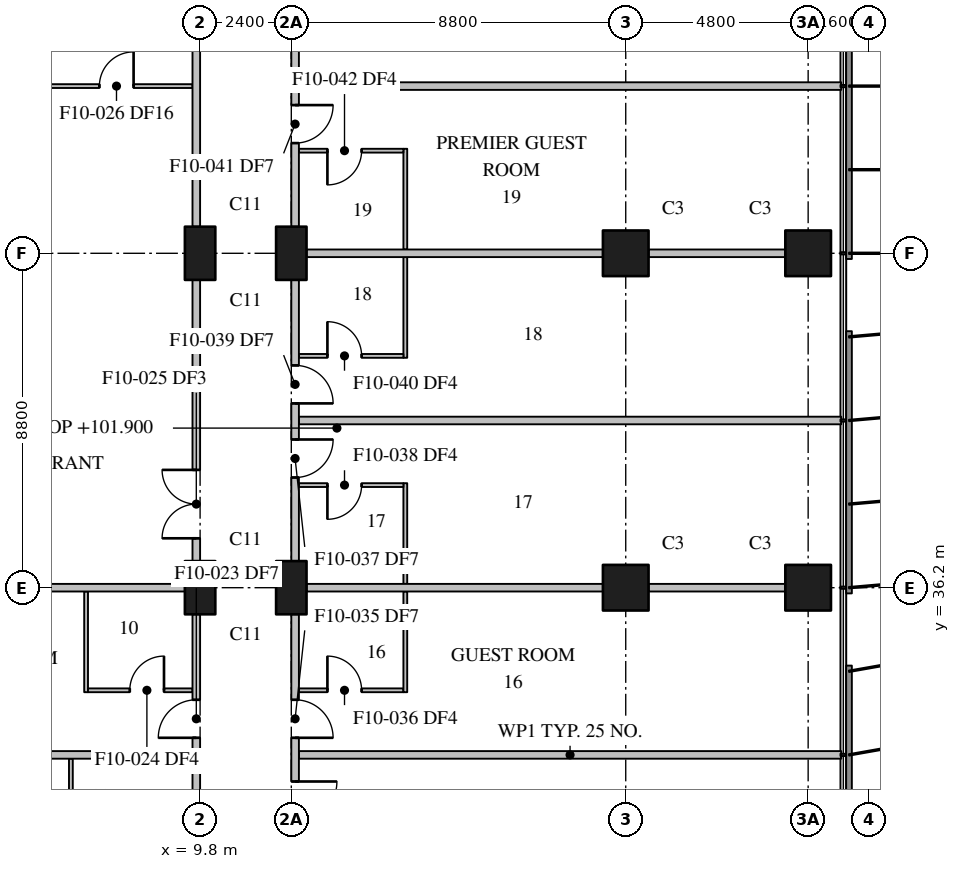
"""IFC4 building model, lengths in metres.
Left out: names, types, materials, properties, quantities, classifications, styles, units other than length and angle.
Written with IfcOpenShell. Run it as: python <this file> out.ifc"""

import sys

from ifc_helpers import new_model, si_unit, direction, frame, frame_2d, origin, origin_2d, place, context, subcontext, project, spatial, rectangle, extrude, element, fill, save


model = new_model("IFC4")
c1 = context("Model", 3, precision=1e-05, world=origin(), true_north=direction((0.0, 1.0)))
c2 = subcontext(c1, "Body", "Model", "MODEL_VIEW")
j1 = project(units=[si_unit("LENGTHUNIT", "METRE"), si_unit("PLANEANGLEUNIT", "RADIAN")], contexts=[c1])
p1 = place(None, origin())
s1 = spatial("IfcSite", under=j1, at=p1, CompositionType="ELEMENT")
p2 = place(p1, origin())
s2 = spatial("IfcBuilding", under=s1, at=p2, CompositionType="ELEMENT")
p3 = place(p2, frame((0.0, 0.0, 101.9)))
s3 = spatial("IfcBuildingStorey", under=s2, at=p3, CompositionType="ELEMENT", Elevation=101.9)
for number, where, z_axis, x_axis in (
    (1, (9.8, 36.2, 0.0), (0.0, 0.0, 1.0), (0.0, 1.0, 0.0)),
    (2, (9.8, 45.0, 0.0), (0.0, 0.0, 1.0), (0.0, 1.0, 0.0)),
    (3, (12.2, 36.2, 0.0), (0.0, 0.0, 1.0), (0.0, 1.0, 0.0)),
    (4, (12.2, 45.0, 0.0), (0.0, 0.0, 1.0), (0.0, 1.0, 0.0)),
):
    element("IfcColumn", number, at=place(p3, frame(where, z_axis=z_axis, x_axis=x_axis)), inside=s3, PredefinedType="COLUMN", context=c2, shape_type="SweptSolid", body=[
        extrude(rectangle(XDim=1.4, YDim=0.8, at=origin_2d()), origin(), (0.0, 0.0, 1.0), 5.5),
    ])
for number, where, z_axis, x_axis in (
    (5, (21.0, 36.2, 0.0), (0.0, 0.0, 1.0), (1.0, 0.0, 0.0)),
    (6, (21.0, 45.0, 0.0), (0.0, 0.0, 1.0), (1.0, 0.0, 0.0)),
    (7, (25.8, 36.2, 0.0), (0.0, 0.0, 1.0), (1.0, 0.0, 0.0)),
    (8, (25.8, 45.0, 0.0), (0.0, 0.0, 1.0), (1.0, 0.0, 0.0)),
):
    element("IfcColumn", number, at=place(p3, frame(where, z_axis=z_axis, x_axis=x_axis)), inside=s3, PredefinedType="COLUMN", context=c2, shape_type="SweptSolid", body=[
        extrude(rectangle(XDim=1.2, YDim=1.2, at=origin_2d()), origin(), (0.0, 0.0, 1.0), 5.5),
    ])
p4 = place(p3, frame((9.7, 28.1, 0.0), z_axis=(0.0, 0.0, 1.0), x_axis=(0.0, 1.0, 0.0)))
e9 = element("IfcWall", 9, at=p4, inside=s3, PredefinedType="PARTITIONING", context=c2, shape_type="SweptSolid", body=[
    extrude(rectangle(XDim=7.4, YDim=0.2, at=frame_2d((3.7, 0.0))), origin(), (0.0, 0.0, 1.0), 5.2),
])
p5 = place(p4, frame((4.15, 0.0, 0.0)))
e10 = element("IfcOpeningElement", 10, at=p5, cuts=e9, PredefinedType="OPENING", context=c2, shape_type="SweptSolid", body=[
    extrude(rectangle(XDim=1.0, YDim=2.1, at=frame_2d((0.5, 1.05))), frame((0.0, 0.11, 0.0), z_axis=(0.0, -1.0, 0.0), x_axis=(1.0, 0.0, 0.0)), (0.0, 0.0, 1.0), 0.22),
])
p6 = place(p3, frame((9.7, 36.9, 0.0), z_axis=(0.0, 0.0, 1.0), x_axis=(0.0, 1.0, 0.0)))
e11 = element("IfcWall", 11, at=p6, inside=s3, PredefinedType="PARTITIONING", context=c2, shape_type="SweptSolid", body=[
    extrude(rectangle(XDim=7.4, YDim=0.2, at=frame_2d((3.7, 0.0))), origin(), (0.0, 0.0, 1.0), 5.2),
])
p7 = place(p6, frame((0.6, 0.0, 0.0)))
e12 = element("IfcOpeningElement", 12, at=p7, cuts=e11, PredefinedType="OPENING", context=c2, shape_type="SweptSolid", body=[
    extrude(rectangle(XDim=1.8, YDim=2.1, at=frame_2d((0.9, 1.05))), frame((0.0, 0.11, 0.0), z_axis=(0.0, -1.0, 0.0), x_axis=(1.0, 0.0, 0.0)), (0.0, 0.0, 1.0), 0.22),
])
p8 = place(p3, frame((9.7, 45.7, 0.0), z_axis=(0.0, 0.0, 1.0), x_axis=(0.0, 1.0, 0.0)))
e13 = element("IfcWall", 13, at=p8, inside=s3, PredefinedType="PARTITIONING", context=c2, shape_type="SweptSolid", body=[
    extrude(rectangle(XDim=7.4, YDim=0.2, at=frame_2d((3.7, 0.0))), origin(), (0.0, 0.0, 1.0), 5.2),
])
p9 = place(p3, frame((0.31, 31.8, 0.0), z_axis=(0.0, 0.0, 1.0), x_axis=(1.0, 0.0, 0.0)))
e14 = element("IfcWall", 14, at=p9, inside=s3, PredefinedType="PARTITIONING", context=c2, shape_type="SweptSolid", body=[
    extrude(rectangle(XDim=9.29, YDim=0.2, at=frame_2d((4.645, 0.0))), origin(), (0.0, 0.0, 1.0), 5.2),
])
p10 = place(p3, frame((12.4, 31.8, 0.0), z_axis=(0.0, 0.0, 1.0), x_axis=(1.0, 0.0, 0.0)))
e15 = element("IfcWall", 15, at=p10, inside=s3, PredefinedType="PARTITIONING", context=c2, shape_type="SweptSolid", body=[
    extrude(rectangle(XDim=14.27, YDim=0.2, at=frame_2d((7.135, 0.0))), origin(), (0.0, 0.0, 1.0), 5.2),
])
for number, where, z_axis, x_axis in (
    (16, (1.6, 36.2, 0.0), (0.0, 0.0, 1.0), (1.0, 0.0, 0.0)),
    (17, (12.6, 36.2, 0.0), (0.0, 0.0, 1.0), (1.0, 0.0, 0.0)),
):
    element("IfcWall", number, at=place(p3, frame(where, z_axis=z_axis, x_axis=x_axis)), inside=s3, PredefinedType="PARTITIONING", context=c2, shape_type="SweptSolid", body=[
        extrude(rectangle(XDim=7.8, YDim=0.2, at=frame_2d((3.9, 0.0))), origin(), (0.0, 0.0, 1.0), 5.2),
    ])
p11 = place(p3, frame((21.6, 36.2, 0.0), z_axis=(0.0, 0.0, 1.0), x_axis=(1.0, 0.0, 0.0)))
e18 = element("IfcWall", 18, at=p11, inside=s3, PredefinedType="PARTITIONING", context=c2, shape_type="SweptSolid", body=[
    extrude(rectangle(XDim=3.6, YDim=0.2, at=frame_2d((1.8, 0.0))), origin(), (0.0, 0.0, 1.0), 5.2),
])
p12 = place(p3, frame((12.3, 35.5, 0.0), z_axis=(0.0, 0.0, 1.0), x_axis=(0.0, -1.0, 0.0)))
e19 = element("IfcWall", 19, at=p12, inside=s3, PredefinedType="PARTITIONING", context=c2, shape_type="SweptSolid", body=[
    extrude(rectangle(XDim=7.4, YDim=0.2, at=frame_2d((3.7, 0.0))), origin(), (0.0, 0.0, 1.0), 5.2),
])
p13 = place(p12, frame((4.4, 0.0, 0.0)))
e20 = element("IfcOpeningElement", 20, at=p13, cuts=e19, PredefinedType="OPENING", context=c2, shape_type="SweptSolid", body=[
    extrude(rectangle(XDim=1.1, YDim=2.1, at=frame_2d((0.55, 1.05))), frame((0.0, 0.11, 0.0), z_axis=(0.0, -1.0, 0.0), x_axis=(1.0, 0.0, 0.0)), (0.0, 0.0, 1.0), 0.22),
])
p14 = place(p12, frame((2.25, 0.0, 0.0)))
e21 = element("IfcOpeningElement", 21, at=p14, cuts=e19, PredefinedType="OPENING", context=c2, shape_type="SweptSolid", body=[
    extrude(rectangle(XDim=1.0, YDim=2.1, at=frame_2d((0.5, 1.05))), frame((0.0, 0.11, 0.0), z_axis=(0.0, -1.0, 0.0), x_axis=(1.0, 0.0, 0.0)), (0.0, 0.0, 1.0), 0.22),
])
p15 = place(p3, frame((12.3, 44.3, 0.0), z_axis=(0.0, 0.0, 1.0), x_axis=(0.0, -1.0, 0.0)))
e22 = element("IfcWall", 22, at=p15, inside=s3, PredefinedType="PARTITIONING", context=c2, shape_type="SweptSolid", body=[
    extrude(rectangle(XDim=7.4, YDim=0.2, at=frame_2d((3.7, 0.0))), origin(), (0.0, 0.0, 1.0), 5.2),
])
p16 = place(p15, frame((4.2, 0.0, 0.0)))
e23 = element("IfcOpeningElement", 23, at=p16, cuts=e22, PredefinedType="OPENING", context=c2, shape_type="SweptSolid", body=[
    extrude(rectangle(XDim=1.0, YDim=2.1, at=frame_2d((0.5, 1.05))), frame((0.0, 0.11, 0.0), z_axis=(0.0, -1.0, 0.0), x_axis=(1.0, 0.0, 0.0)), (0.0, 0.0, 1.0), 0.22),
])
p17 = place(p15, frame((2.25, 0.0, 0.0)))
e24 = element("IfcOpeningElement", 24, at=p17, cuts=e22, PredefinedType="OPENING", context=c2, shape_type="SweptSolid", body=[
    extrude(rectangle(XDim=1.0, YDim=2.1, at=frame_2d((0.5, 1.05))), frame((0.0, 0.11, 0.0), z_axis=(0.0, -1.0, 0.0), x_axis=(1.0, 0.0, 0.0)), (0.0, 0.0, 1.0), 0.22),
])
p18 = place(p3, frame((12.3, 53.1, 0.0), z_axis=(0.0, 0.0, 1.0), x_axis=(0.0, -1.0, 0.0)))
e25 = element("IfcWall", 25, at=p18, inside=s3, PredefinedType="PARTITIONING", context=c2, shape_type="SweptSolid", body=[
    extrude(rectangle(XDim=7.4, YDim=0.2, at=frame_2d((3.7, 0.0))), origin(), (0.0, 0.0, 1.0), 5.2),
])
p19 = place(p18, frame((4.2, 0.0, 0.0)))
e26 = element("IfcOpeningElement", 26, at=p19, cuts=e25, PredefinedType="OPENING", context=c2, shape_type="SweptSolid", body=[
    extrude(rectangle(XDim=1.0, YDim=2.1, at=frame_2d((0.5, 1.05))), frame((0.0, 0.11, 0.0), z_axis=(0.0, -1.0, 0.0), x_axis=(1.0, 0.0, 0.0)), (0.0, 0.0, 1.0), 0.22),
])
p20 = place(p18, frame((0.6, 0.0, 0.0)))
e27 = element("IfcOpeningElement", 27, at=p20, cuts=e25, PredefinedType="OPENING", context=c2, shape_type="SweptSolid", body=[
    extrude(rectangle(XDim=1.8, YDim=2.1, at=frame_2d((0.9, 1.05))), frame((0.0, 0.11, 0.0), z_axis=(0.0, -1.0, 0.0), x_axis=(1.0, 0.0, 0.0)), (0.0, 0.0, 1.0), 0.22),
])
p21 = place(p3, frame((12.4, 40.6, 0.0), z_axis=(0.0, 0.0, 1.0), x_axis=(1.0, 0.0, 0.0)))
e28 = element("IfcWall", 28, at=p21, inside=s3, PredefinedType="PARTITIONING", context=c2, shape_type="SweptSolid", body=[
    extrude(rectangle(XDim=14.27, YDim=0.2, at=frame_2d((7.135, 0.0))), origin(), (0.0, 0.0, 1.0), 5.2),
])
p22 = place(p3, frame((12.6, 45.0, 0.0), z_axis=(0.0, 0.0, 1.0), x_axis=(1.0, 0.0, 0.0)))
e29 = element("IfcWall", 29, at=p22, inside=s3, PredefinedType="PARTITIONING", context=c2, shape_type="SweptSolid", body=[
    extrude(rectangle(XDim=7.8, YDim=0.2, at=frame_2d((3.9, 0.0))), origin(), (0.0, 0.0, 1.0), 5.2),
])
p23 = place(p3, frame((21.6, 45.0, 0.0), z_axis=(0.0, 0.0, 1.0), x_axis=(1.0, 0.0, 0.0)))
e30 = element("IfcWall", 30, at=p23, inside=s3, PredefinedType="PARTITIONING", context=c2, shape_type="SweptSolid", body=[
    extrude(rectangle(XDim=3.6, YDim=0.2, at=frame_2d((1.8, 0.0))), origin(), (0.0, 0.0, 1.0), 5.2),
])
p24 = place(p3, frame((12.4, 49.4, 0.0), z_axis=(0.0, 0.0, 1.0), x_axis=(1.0, 0.0, 0.0)))
e31 = element("IfcWall", 31, at=p24, inside=s3, PredefinedType="PARTITIONING", context=c2, shape_type="SweptSolid", body=[
    extrude(rectangle(XDim=14.27, YDim=0.2, at=frame_2d((7.135, 0.0))), origin(), (0.0, 0.0, 1.0), 5.2),
])
p25 = place(p3, frame((6.8, 33.45, 0.0), z_axis=(0.0, 0.0, 1.0), x_axis=(0.0, 1.0, 0.0)))
e32 = element("IfcWall", 32, at=p25, inside=s3, PredefinedType="PARTITIONING", context=c2, shape_type="SweptSolid", body=[
    extrude(rectangle(XDim=2.65, YDim=0.1, at=frame_2d((1.325, 0.0))), origin(), (0.0, 0.0, 1.0), 5.2),
])
p26 = place(p3, frame((6.4, 29.55, 0.0), z_axis=(0.0, 0.0, 1.0), x_axis=(0.0, 1.0, 0.0)))
e33 = element("IfcWall", 33, at=p26, inside=s3, PredefinedType="PARTITIONING", context=c2, shape_type="SweptSolid", body=[
    extrude(rectangle(XDim=2.15, YDim=0.1, at=frame_2d((1.075, 0.0))), origin(), (0.0, 0.0, 1.0), 5.2),
])
p27 = place(p3, frame((6.85, 33.5, 0.0), z_axis=(0.0, 0.0, 1.0), x_axis=(1.0, 0.0, 0.0)))
e34 = element("IfcWall", 34, at=p27, inside=s3, PredefinedType="PARTITIONING", context=c2, shape_type="SweptSolid", body=[
    extrude(rectangle(XDim=2.75, YDim=0.1, at=frame_2d((1.375, 0.0))), origin(), (0.0, 0.0, 1.0), 5.2),
])
p28 = place(p27, frame((1.1, 0.0, 0.0)))
e35 = element("IfcOpeningElement", 35, at=p28, cuts=e34, PredefinedType="OPENING", context=c2, shape_type="SweptSolid", body=[
    extrude(rectangle(XDim=0.9, YDim=2.1, at=frame_2d((0.45, 1.05))), frame((0.0, 0.06, 0.0), z_axis=(0.0, -1.0, 0.0), x_axis=(1.0, 0.0, 0.0)), (0.0, 0.0, 1.0), 0.12),
])
p29 = place(p3, frame((12.4, 33.5, 0.0), z_axis=(0.0, 0.0, 1.0), x_axis=(1.0, 0.0, 0.0)))
e36 = element("IfcWall", 36, at=p29, inside=s3, PredefinedType="PARTITIONING", context=c2, shape_type="SweptSolid", body=[
    extrude(rectangle(XDim=2.75, YDim=0.1, at=frame_2d((1.375, 0.0))), origin(), (0.0, 0.0, 1.0), 5.2),
])
p30 = place(p29, frame((0.75, 0.0, 0.0)))
e37 = element("IfcOpeningElement", 37, at=p30, cuts=e36, PredefinedType="OPENING", context=c2, shape_type="SweptSolid", body=[
    extrude(rectangle(XDim=0.9, YDim=2.1, at=frame_2d((0.45, 1.05))), frame((0.0, 0.06, 0.0), z_axis=(0.0, -1.0, 0.0), x_axis=(1.0, 0.0, 0.0)), (0.0, 0.0, 1.0), 0.12),
])
p31 = place(p3, frame((5.45, 49.4, 0.0), z_axis=(0.0, 0.0, 1.0), x_axis=(1.0, 0.0, 0.0)))
e38 = element("IfcWall", 38, at=p31, inside=s3, PredefinedType="PARTITIONING", context=c2, shape_type="SweptSolid", body=[
    extrude(rectangle(XDim=4.15, YDim=0.1, at=frame_2d((2.075, 0.0))), origin(), (0.0, 0.0, 1.0), 5.2),
])
p32 = place(p31, frame((1.7, 0.0, 0.0)))
e39 = element("IfcOpeningElement", 39, at=p32, cuts=e38, PredefinedType="OPENING", context=c2, shape_type="SweptSolid", body=[
    extrude(rectangle(XDim=0.9, YDim=2.1, at=frame_2d((0.45, 1.05))), frame((0.0, 0.06, 0.0), z_axis=(0.0, -1.0, 0.0), x_axis=(1.0, 0.0, 0.0)), (0.0, 0.0, 1.0), 0.12),
])
p33 = place(p3, frame((15.2, 33.45, 0.0), z_axis=(0.0, 0.0, 1.0), x_axis=(0.0, 1.0, 0.0)))
e40 = element("IfcWall", 40, at=p33, inside=s3, PredefinedType="PARTITIONING", context=c2, shape_type="SweptSolid", body=[
    extrude(rectangle(XDim=2.65, YDim=0.1, at=frame_2d((1.325, 0.0))), origin(), (0.0, 0.0, 1.0), 5.2),
])
for number, where, z_axis, x_axis in (
    (41, (15.2, 36.3, 0.0), (0.0, 0.0, 1.0), (0.0, 1.0, 0.0)),
    (42, (15.2, 42.25, 0.0), (0.0, 0.0, 1.0), (0.0, 1.0, 0.0)),
    (43, (15.2, 45.1, 0.0), (0.0, 0.0, 1.0), (0.0, 1.0, 0.0)),
):
    element("IfcWall", number, at=place(p3, frame(where, z_axis=z_axis, x_axis=x_axis)), inside=s3, PredefinedType="PARTITIONING", context=c2, shape_type="SweptSolid", body=[
        extrude(rectangle(XDim=2.65, YDim=0.1, at=frame_2d((1.325, 0.0))), origin(), (0.0, 0.0, 1.0), 5.2),
    ])
p34 = place(p3, frame((15.15, 38.9, 0.0), z_axis=(0.0, 0.0, 1.0), x_axis=(-1.0, 0.0, 0.0)))
e44 = element("IfcWall", 44, at=p34, inside=s3, PredefinedType="PARTITIONING", context=c2, shape_type="SweptSolid", body=[
    extrude(rectangle(XDim=2.75, YDim=0.1, at=frame_2d((1.375, 0.0))), origin(), (0.0, 0.0, 1.0), 5.2),
])
p35 = place(p34, frame((1.1, 0.0, 0.0)))
e45 = element("IfcOpeningElement", 45, at=p35, cuts=e44, PredefinedType="OPENING", context=c2, shape_type="SweptSolid", body=[
    extrude(rectangle(XDim=0.9, YDim=2.1, at=frame_2d((0.45, 1.05))), frame((0.0, 0.06, 0.0), z_axis=(0.0, -1.0, 0.0), x_axis=(1.0, 0.0, 0.0)), (0.0, 0.0, 1.0), 0.12),
])
p36 = place(p3, frame((12.4, 42.3, 0.0), z_axis=(0.0, 0.0, 1.0), x_axis=(1.0, 0.0, 0.0)))
e46 = element("IfcWall", 46, at=p36, inside=s3, PredefinedType="PARTITIONING", context=c2, shape_type="SweptSolid", body=[
    extrude(rectangle(XDim=2.75, YDim=0.1, at=frame_2d((1.375, 0.0))), origin(), (0.0, 0.0, 1.0), 5.2),
])
p37 = place(p36, frame((0.75, 0.0, 0.0)))
e47 = element("IfcOpeningElement", 47, at=p37, cuts=e46, PredefinedType="OPENING", context=c2, shape_type="SweptSolid", body=[
    extrude(rectangle(XDim=0.9, YDim=2.1, at=frame_2d((0.45, 1.05))), frame((0.0, 0.06, 0.0), z_axis=(0.0, -1.0, 0.0), x_axis=(1.0, 0.0, 0.0)), (0.0, 0.0, 1.0), 0.12),
])
p38 = place(p3, frame((15.15, 47.7, 0.0), z_axis=(0.0, 0.0, 1.0), x_axis=(-1.0, 0.0, 0.0)))
e48 = element("IfcWall", 48, at=p38, inside=s3, PredefinedType="PARTITIONING", context=c2, shape_type="SweptSolid", body=[
    extrude(rectangle(XDim=2.75, YDim=0.1, at=frame_2d((1.375, 0.0))), origin(), (0.0, 0.0, 1.0), 5.2),
])
p39 = place(p38, frame((1.1, 0.0, 0.0)))
e49 = element("IfcOpeningElement", 49, at=p39, cuts=e48, PredefinedType="OPENING", context=c2, shape_type="SweptSolid", body=[
    extrude(rectangle(XDim=0.9, YDim=2.1, at=frame_2d((0.45, 1.05))), frame((0.0, 0.06, 0.0), z_axis=(0.0, -1.0, 0.0), x_axis=(1.0, 0.0, 0.0)), (0.0, 0.0, 1.0), 0.12),
])
p40 = place(p5, origin())
e50 = element("IfcDoor", 50, at=p40, inside=s3, OperationType="SINGLE_SWING_LEFT", PredefinedType="DOOR", context=c2, shape_type="SweptSolid", body=[
    extrude(rectangle(XDim=1.0, YDim=2.1, at=frame_2d((0.5, 1.05))), frame((0.0, 0.025, 0.0), z_axis=(0.0, -1.0, 0.0), x_axis=(1.0, 0.0, 0.0)), (0.0, 0.0, 1.0), 0.05),
])
fill(e10, e50)
p41 = place(p28, origin())
e51 = element("IfcDoor", 51, at=p41, inside=s3, OperationType="SINGLE_SWING_RIGHT", PredefinedType="DOOR", context=c2, shape_type="SweptSolid", body=[
    extrude(rectangle(XDim=0.9, YDim=2.1, at=frame_2d((0.45, 1.05))), frame((0.0, 0.025, 0.0), z_axis=(0.0, -1.0, 0.0), x_axis=(1.0, 0.0, 0.0)), (0.0, 0.0, 1.0), 0.05),
])
fill(e35, e51)
p42 = place(p7, origin())
e52 = element("IfcDoor", 52, at=p42, inside=s3, OperationType="DOUBLE_DOOR_SINGLE_SWING", PredefinedType="DOOR", context=c2, shape_type="SweptSolid", body=[
    extrude(rectangle(XDim=1.8, YDim=2.1, at=frame_2d((0.9, 1.05))), frame((0.0, 0.025, 0.0), z_axis=(0.0, -1.0, 0.0), x_axis=(1.0, 0.0, 0.0)), (0.0, 0.0, 1.0), 0.05),
])
fill(e12, e52)
p43 = place(p32, origin())
e53 = element("IfcDoor", 53, at=p43, inside=s3, OperationType="SINGLE_SWING_RIGHT", PredefinedType="DOOR", context=c2, shape_type="SweptSolid", body=[
    extrude(rectangle(XDim=0.9, YDim=2.1, at=frame_2d((0.45, 1.05))), frame((0.0, 0.025, 0.0), z_axis=(0.0, -1.0, 0.0), x_axis=(1.0, 0.0, 0.0)), (0.0, 0.0, 1.0), 0.05),
])
fill(e39, e53)
p44 = place(p13, origin())
e54 = element("IfcDoor", 54, at=p44, inside=s3, OperationType="SINGLE_SWING_LEFT", PredefinedType="DOOR", context=c2, shape_type="SweptSolid", body=[
    extrude(rectangle(XDim=1.1, YDim=2.1, at=frame_2d((0.55, 1.05))), frame((0.0, 0.025, 0.0), z_axis=(0.0, -1.0, 0.0), x_axis=(1.0, 0.0, 0.0)), (0.0, 0.0, 1.0), 0.05),
])
fill(e20, e54)
p45 = place(p14, origin())
e55 = element("IfcDoor", 55, at=p45, inside=s3, OperationType="SINGLE_SWING_RIGHT", PredefinedType="DOOR", context=c2, shape_type="SweptSolid", body=[
    extrude(rectangle(XDim=1.0, YDim=2.1, at=frame_2d((0.5, 1.05))), frame((0.0, 0.025, 0.0), z_axis=(0.0, -1.0, 0.0), x_axis=(1.0, 0.0, 0.0)), (0.0, 0.0, 1.0), 0.05),
])
fill(e21, e55)
p46 = place(p30, origin())
e56 = element("IfcDoor", 56, at=p46, inside=s3, OperationType="SINGLE_SWING_LEFT", PredefinedType="DOOR", context=c2, shape_type="SweptSolid", body=[
    extrude(rectangle(XDim=0.9, YDim=2.1, at=frame_2d((0.45, 1.05))), frame((0.0, 0.025, 0.0), z_axis=(0.0, -1.0, 0.0), x_axis=(1.0, 0.0, 0.0)), (0.0, 0.0, 1.0), 0.05),
])
fill(e37, e56)
p47 = place(p16, origin())
e57 = element("IfcDoor", 57, at=p47, inside=s3, OperationType="SINGLE_SWING_LEFT", PredefinedType="DOOR", context=c2, shape_type="SweptSolid", body=[
    extrude(rectangle(XDim=1.0, YDim=2.1, at=frame_2d((0.5, 1.05))), frame((0.0, 0.025, 0.0), z_axis=(0.0, -1.0, 0.0), x_axis=(1.0, 0.0, 0.0)), (0.0, 0.0, 1.0), 0.05),
])
fill(e23, e57)
p48 = place(p35, origin())
e58 = element("IfcDoor", 58, at=p48, inside=s3, OperationType="SINGLE_SWING_RIGHT", PredefinedType="DOOR", context=c2, shape_type="SweptSolid", body=[
    extrude(rectangle(XDim=0.9, YDim=2.1, at=frame_2d((0.45, 1.05))), frame((0.0, 0.025, 0.0), z_axis=(0.0, -1.0, 0.0), x_axis=(1.0, 0.0, 0.0)), (0.0, 0.0, 1.0), 0.05),
])
fill(e45, e58)
p49 = place(p17, origin())
e59 = element("IfcDoor", 59, at=p49, inside=s3, OperationType="SINGLE_SWING_RIGHT", PredefinedType="DOOR", context=c2, shape_type="SweptSolid", body=[
    extrude(rectangle(XDim=1.0, YDim=2.1, at=frame_2d((0.5, 1.05))), frame((0.0, 0.025, 0.0), z_axis=(0.0, -1.0, 0.0), x_axis=(1.0, 0.0, 0.0)), (0.0, 0.0, 1.0), 0.05),
])
fill(e24, e59)
p50 = place(p37, origin())
e60 = element("IfcDoor", 60, at=p50, inside=s3, OperationType="SINGLE_SWING_LEFT", PredefinedType="DOOR", context=c2, shape_type="SweptSolid", body=[
    extrude(rectangle(XDim=0.9, YDim=2.1, at=frame_2d((0.45, 1.05))), frame((0.0, 0.025, 0.0), z_axis=(0.0, -1.0, 0.0), x_axis=(1.0, 0.0, 0.0)), (0.0, 0.0, 1.0), 0.05),
])
fill(e47, e60)
p51 = place(p19, origin())
e61 = element("IfcDoor", 61, at=p51, inside=s3, OperationType="SINGLE_SWING_LEFT", PredefinedType="DOOR", context=c2, shape_type="SweptSolid", body=[
    extrude(rectangle(XDim=1.0, YDim=2.1, at=frame_2d((0.5, 1.05))), frame((0.0, 0.025, 0.0), z_axis=(0.0, -1.0, 0.0), x_axis=(1.0, 0.0, 0.0)), (0.0, 0.0, 1.0), 0.05),
])
fill(e26, e61)
p52 = place(p39, origin())
e62 = element("IfcDoor", 62, at=p52, inside=s3, OperationType="SINGLE_SWING_RIGHT", PredefinedType="DOOR", context=c2, shape_type="SweptSolid", body=[
    extrude(rectangle(XDim=0.9, YDim=2.1, at=frame_2d((0.45, 1.05))), frame((0.0, 0.025, 0.0), z_axis=(0.0, -1.0, 0.0), x_axis=(1.0, 0.0, 0.0)), (0.0, 0.0, 1.0), 0.05),
])
fill(e49, e62)
save(model, sys.argv[1])
